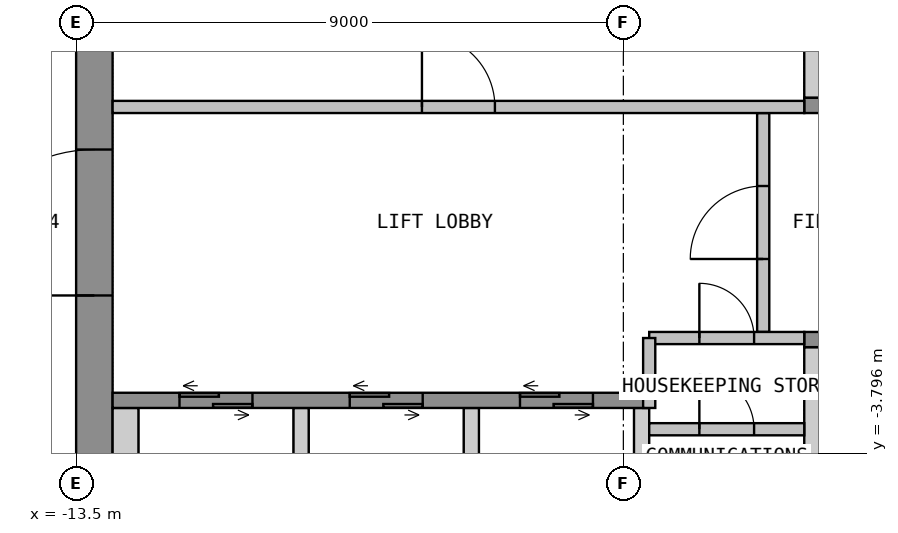
"""IFC4 building model, lengths in metres.
Left out: names, types, materials, properties, quantities, classifications, styles, units other than length and angle.
Written with IfcOpenShell. Run it as: python <this file> out.ifc"""

import sys

from ifc_helpers import new_model, si_unit, direction, frame, frame_2d, origin, place, context, subcontext, project, spatial, polyline, rectangle, outline, extrude, element, fill, save


model = new_model("IFC4")
c1 = context("Model", 3, precision=1e-05, world=origin(), true_north=direction((0.0, 1.0)))
c2 = subcontext(c1, "Body", "Model", "MODEL_VIEW")
j1 = project(units=[si_unit("LENGTHUNIT", "METRE"), si_unit("PLANEANGLEUNIT", "RADIAN")], contexts=[c1])
p1 = place(None, origin())
s1 = spatial("IfcSite", under=j1, at=p1, CompositionType="ELEMENT")
p2 = place(p1, origin())
s2 = spatial("IfcBuilding", under=s1, at=p2, CompositionType="ELEMENT")
p3 = place(p2, frame((0.0, 0.0, 179.4)))
s3 = spatial("IfcBuildingStorey", under=s2, at=p3, CompositionType="ELEMENT", Elevation=179.4)
p4 = place(p3, frame((-13.2, -10.65, 0.0), z_axis=(0.0, 0.0, 1.0), x_axis=(0.0, 1.0, 0.0)))
e1 = element("IfcWall", 1, at=p4, inside=s3, PredefinedType="SHEAR", context=c2, shape_type="SweptSolid", body=[
    extrude(rectangle(XDim=21.3, YDim=0.6, at=frame_2d((10.65, 0.0))), origin(), (0.0, 0.0, 1.0), 4.15),
])
p5 = place(p4, frame((9.45, 0.0, 0.0)))
e2 = element("IfcOpeningElement", 2, at=p5, cuts=e1, PredefinedType="OPENING", context=c2, shape_type="SweptSolid", body=[
    extrude(rectangle(XDim=2.4, YDim=2.1, at=frame_2d((1.2, 1.05))), frame((0.0, 0.31, 0.0), z_axis=(0.0, -1.0, 0.0), x_axis=(1.0, 0.0, 0.0)), (0.0, 0.0, 1.0), 0.62),
])
p6 = place(p3, origin())
e3 = element("IfcWall", 3, at=p6, inside=s3, PredefinedType="SHEAR", context=c2, shape_type="SweptSolid", body=[
    extrude(outline(polyline([(-1.525, 2.05), (-1.275, 2.05), (-1.275, 4.75), (-1.525, 4.75), (-1.525, 2.05)])), origin(), (0.0, 0.0, 1.0), 4.15),
])
p7 = place(p3, frame((-1.525, 1.925, 0.0), z_axis=(0.0, 0.0, 1.0), x_axis=(1.0, 0.0, 0.0)))
e4 = element("IfcWall", 4, at=p7, inside=s3, PredefinedType="SHEAR", context=c2, shape_type="SweptSolid", body=[
    extrude(rectangle(XDim=3.05, YDim=0.25, at=frame_2d((1.525, 0.0))), origin(), (0.0, 0.0, 1.0), 4.15),
])
p8 = place(p7, frame((0.925, 0.0, 0.0)))
e5 = element("IfcOpeningElement", 5, at=p8, cuts=e4, PredefinedType="OPENING", context=c2, shape_type="SweptSolid", body=[
    extrude(rectangle(XDim=1.2, YDim=2.1, at=frame_2d((0.6, 1.05))), frame((0.0, 0.135, 0.0), z_axis=(0.0, -1.0, 0.0), x_axis=(1.0, 0.0, 0.0)), (0.0, 0.0, 1.0), 0.27),
])
p9 = place(p3, origin())
e6 = element("IfcWall", 6, at=p9, inside=s3, PredefinedType="SHEAR", context=c2, shape_type="SweptSolid", body=[
    extrude(outline(polyline([(-12.9, -4.75), (-12.475, -4.75), (-12.475, -3.05), (-12.9, -3.05), (-12.9, -4.75)])), origin(), (0.0, 0.0, 1.0), 4.15),
])
p10 = place(p3, origin())
e7 = element("IfcWall", 7, at=p10, inside=s3, PredefinedType="SHEAR", context=c2, shape_type="SweptSolid", body=[
    extrude(outline(polyline([(-9.925, -4.75), (-9.675, -4.75), (-9.675, -3.05), (-9.925, -3.05), (-9.925, -4.75)])), origin(), (0.0, 0.0, 1.0), 4.15),
])
p11 = place(p3, origin())
e8 = element("IfcWall", 8, at=p11, inside=s3, PredefinedType="SHEAR", context=c2, shape_type="SweptSolid", body=[
    extrude(outline(polyline([(-7.125, -4.75), (-6.875, -4.75), (-6.875, -3.05), (-7.125, -3.05), (-7.125, -4.75)])), origin(), (0.0, 0.0, 1.0), 4.15),
])
p12 = place(p3, origin())
e9 = element("IfcWall", 9, at=p12, inside=s3, PredefinedType="SHEAR", context=c2, shape_type="SweptSolid", body=[
    extrude(outline(polyline([(-4.325, -4.75), (-4.075, -4.75), (-4.075, -3.05), (-4.325, -3.05), (-4.325, -4.75)])), origin(), (0.0, 0.0, 1.0), 4.15),
])
p13 = place(p3, origin())
e10 = element("IfcWall", 10, at=p13, inside=s3, PredefinedType="SHEAR", context=c2, shape_type="SweptSolid", body=[
    extrude(outline(polyline([(-1.525, -4.75), (-1.275, -4.75), (-1.275, -2.05), (-1.525, -2.05), (-1.525, -4.75)])), origin(), (0.0, 0.0, 1.0), 4.15),
])
p14 = place(p3, frame((-12.9, -2.925, 0.0), z_axis=(0.0, 0.0, 1.0), x_axis=(1.0, 0.0, 0.0)))
e11 = element("IfcWall", 11, at=p14, inside=s3, PredefinedType="SHEAR", context=c2, shape_type="SweptSolid", body=[
    extrude(rectangle(XDim=8.825, YDim=0.25, at=frame_2d((4.413, 0.0))), origin(), (0.0, 0.0, 1.0), 4.15),
])
p15 = place(p14, frame((1.1, 0.0, 0.0)))
e12 = element("IfcOpeningElement", 12, at=p15, cuts=e11, PredefinedType="OPENING", context=c2, shape_type="SweptSolid", body=[
    extrude(rectangle(XDim=1.2, YDim=2.1, at=frame_2d((0.6, 1.05))), frame((0.0, 0.135, 0.0), z_axis=(0.0, -1.0, 0.0), x_axis=(1.0, 0.0, 0.0)), (0.0, 0.0, 1.0), 0.27),
])
p16 = place(p14, frame((3.9, 0.0, 0.0)))
e13 = element("IfcOpeningElement", 13, at=p16, cuts=e11, PredefinedType="OPENING", context=c2, shape_type="SweptSolid", body=[
    extrude(rectangle(XDim=1.2, YDim=2.1, at=frame_2d((0.6, 1.05))), frame((0.0, 0.135, 0.0), z_axis=(0.0, -1.0, 0.0), x_axis=(1.0, 0.0, 0.0)), (0.0, 0.0, 1.0), 0.27),
])
p17 = place(p14, frame((6.7, 0.0, 0.0)))
e14 = element("IfcOpeningElement", 14, at=p17, cuts=e11, PredefinedType="OPENING", context=c2, shape_type="SweptSolid", body=[
    extrude(rectangle(XDim=1.2, YDim=2.1, at=frame_2d((0.6, 1.05))), frame((0.0, 0.135, 0.0), z_axis=(0.0, -1.0, 0.0), x_axis=(1.0, 0.0, 0.0)), (0.0, 0.0, 1.0), 0.27),
])
p18 = place(p3, frame((-1.525, -1.925, 0.0), z_axis=(0.0, 0.0, 1.0), x_axis=(1.0, 0.0, 0.0)))
e15 = element("IfcWall", 15, at=p18, inside=s3, PredefinedType="SHEAR", context=c2, shape_type="SweptSolid", body=[
    extrude(rectangle(XDim=14.425, YDim=0.25, at=frame_2d((7.212, 0.0))), origin(), (0.0, 0.0, 1.0), 4.15),
])
p19 = place(p18, frame((0.925, 0.0, 0.0)))
e16 = element("IfcOpeningElement", 16, at=p19, cuts=e15, PredefinedType="OPENING", context=c2, shape_type="SweptSolid", body=[
    extrude(rectangle(XDim=1.2, YDim=2.1, at=frame_2d((0.6, 1.05))), frame((0.0, 0.135, 0.0), z_axis=(0.0, -1.0, 0.0), x_axis=(1.0, 0.0, 0.0)), (0.0, 0.0, 1.0), 0.27),
])
p20 = place(p18, frame((3.725, 0.0, 0.0)))
e17 = element("IfcOpeningElement", 17, at=p20, cuts=e15, PredefinedType="OPENING", context=c2, shape_type="SweptSolid", body=[
    extrude(rectangle(XDim=1.2, YDim=2.1, at=frame_2d((0.6, 1.05))), frame((0.0, 0.135, 0.0), z_axis=(0.0, -1.0, 0.0), x_axis=(1.0, 0.0, 0.0)), (0.0, 0.0, 1.0), 0.27),
])
p21 = place(p3, frame((-2.2, -1.8, 0.0), z_axis=(0.0, 0.0, 1.0), x_axis=(0.0, 1.0, 0.0)))
e18 = element("IfcWall", 18, at=p21, inside=s3, PredefinedType="PARTITIONING", context=c2, shape_type="SweptSolid", body=[
    extrude(rectangle(XDim=3.6, YDim=0.2, at=frame_2d((1.8, 0.0))), origin(), (0.0, 0.0, 1.0), 4.15),
])
p22 = place(p21, frame((1.2, 0.0, 0.0)))
e19 = element("IfcOpeningElement", 19, at=p22, cuts=e18, PredefinedType="OPENING", context=c2, shape_type="SweptSolid", body=[
    extrude(rectangle(XDim=1.2, YDim=2.1, at=frame_2d((0.6, 1.05))), frame((0.0, 0.11, 0.0), z_axis=(0.0, -1.0, 0.0), x_axis=(1.0, 0.0, 0.0)), (0.0, 0.0, 1.0), 0.22),
])
p23 = place(p3, frame((-12.9, 1.9, 0.0), z_axis=(0.0, 0.0, 1.0), x_axis=(1.0, 0.0, 0.0)))
e20 = element("IfcWall", 20, at=p23, inside=s3, PredefinedType="PARTITIONING", context=c2, shape_type="SweptSolid", body=[
    extrude(rectangle(XDim=11.375, YDim=0.2, at=frame_2d((5.688, 0.0))), origin(), (0.0, 0.0, 1.0), 4.15),
])
p24 = place(p23, frame((5.087, 0.0, 0.0)))
e21 = element("IfcOpeningElement", 21, at=p24, cuts=e20, PredefinedType="OPENING", context=c2, shape_type="SweptSolid", body=[
    extrude(rectangle(XDim=1.2, YDim=2.1, at=frame_2d((0.6, 1.05))), frame((0.0, 0.11, 0.0), z_axis=(0.0, -1.0, 0.0), x_axis=(1.0, 0.0, 0.0)), (0.0, 0.0, 1.0), 0.22),
])
p25 = place(p3, frame((-4.075, -3.4, 0.0), z_axis=(0.0, 0.0, 1.0), x_axis=(1.0, 0.0, 0.0)))
e22 = element("IfcWall", 22, at=p25, inside=s3, PredefinedType="PARTITIONING", context=c2, shape_type="SweptSolid", body=[
    extrude(rectangle(XDim=2.55, YDim=0.2, at=frame_2d((1.275, 0.0))), origin(), (0.0, 0.0, 1.0), 4.15),
])
p26 = place(p25, frame((0.825, 0.0, 0.0)))
e23 = element("IfcOpeningElement", 23, at=p26, cuts=e22, PredefinedType="OPENING", context=c2, shape_type="SweptSolid", body=[
    extrude(rectangle(XDim=0.9, YDim=2.1, at=frame_2d((0.45, 1.05))), frame((0.0, 0.11, 0.0), z_axis=(0.0, -1.0, 0.0), x_axis=(1.0, 0.0, 0.0)), (0.0, 0.0, 1.0), 0.22),
])
p27 = place(p3, frame((-4.075, -1.9, 0.0), z_axis=(0.0, 0.0, 1.0), x_axis=(1.0, 0.0, 0.0)))
e24 = element("IfcWall", 24, at=p27, inside=s3, PredefinedType="PARTITIONING", context=c2, shape_type="SweptSolid", body=[
    extrude(rectangle(XDim=2.55, YDim=0.2, at=frame_2d((1.275, 0.0))), origin(), (0.0, 0.0, 1.0), 4.15),
])
p28 = place(p27, frame((0.825, 0.0, 0.0)))
e25 = element("IfcOpeningElement", 25, at=p28, cuts=e24, PredefinedType="OPENING", context=c2, shape_type="SweptSolid", body=[
    extrude(rectangle(XDim=0.9, YDim=2.1, at=frame_2d((0.45, 1.05))), frame((0.0, 0.11, 0.0), z_axis=(0.0, -1.0, 0.0), x_axis=(1.0, 0.0, 0.0)), (0.0, 0.0, 1.0), 0.22),
])
p29 = place(p3, frame((-4.075, -1.9, 0.0), z_axis=(0.0, 0.0, 1.0), x_axis=(0.0, -1.0, 0.0)))
e26 = element("IfcWall", 26, at=p29, inside=s3, PredefinedType="PARTITIONING", context=c2, shape_type="SweptSolid", body=[
    extrude(rectangle(XDim=1.15, YDim=0.2, at=frame_2d((0.575, 0.0))), origin(), (0.0, 0.0, 1.0), 4.15),
])
p30 = place(p5, origin())
e27 = element("IfcDoor", 27, at=p30, inside=s3, OperationType="DOUBLE_DOOR_DOUBLE_SWING", PredefinedType="DOOR", context=c2, shape_type="SweptSolid", body=[
    extrude(rectangle(XDim=2.4, YDim=2.1, at=frame_2d((1.2, 1.05))), frame((0.0, 0.025, 0.0), z_axis=(0.0, -1.0, 0.0), x_axis=(1.0, 0.0, 0.0)), (0.0, 0.0, 1.0), 0.05),
])
fill(e2, e27)
p31 = place(p15, origin())
e28 = element("IfcDoor", 28, at=p31, inside=s3, OperationType="DOUBLE_DOOR_SLIDING", PredefinedType="DOOR", context=c2, shape_type="SweptSolid", body=[
    extrude(rectangle(XDim=1.2, YDim=2.1, at=frame_2d((0.6, 1.05))), frame((0.0, 0.025, 0.0), z_axis=(0.0, -1.0, 0.0), x_axis=(1.0, 0.0, 0.0)), (0.0, 0.0, 1.0), 0.05),
])
fill(e12, e28)
p32 = place(p16, origin())
e29 = element("IfcDoor", 29, at=p32, inside=s3, OperationType="DOUBLE_DOOR_SLIDING", PredefinedType="DOOR", context=c2, shape_type="SweptSolid", body=[
    extrude(rectangle(XDim=1.2, YDim=2.1, at=frame_2d((0.6, 1.05))), frame((0.0, 0.025, 0.0), z_axis=(0.0, -1.0, 0.0), x_axis=(1.0, 0.0, 0.0)), (0.0, 0.0, 1.0), 0.05),
])
fill(e13, e29)
p33 = place(p17, origin())
e30 = element("IfcDoor", 30, at=p33, inside=s3, OperationType="DOUBLE_DOOR_SLIDING", PredefinedType="DOOR", context=c2, shape_type="SweptSolid", body=[
    extrude(rectangle(XDim=1.2, YDim=2.1, at=frame_2d((0.6, 1.05))), frame((0.0, 0.025, 0.0), z_axis=(0.0, -1.0, 0.0), x_axis=(1.0, 0.0, 0.0)), (0.0, 0.0, 1.0), 0.05),
])
fill(e14, e30)
p34 = place(p22, origin())
e31 = element("IfcDoor", 31, at=p34, inside=s3, OperationType="SINGLE_SWING_LEFT", PredefinedType="DOOR", context=c2, shape_type="SweptSolid", body=[
    extrude(rectangle(XDim=1.2, YDim=2.1, at=frame_2d((0.6, 1.05))), frame((0.0, 0.025, 0.0), z_axis=(0.0, -1.0, 0.0), x_axis=(1.0, 0.0, 0.0)), (0.0, 0.0, 1.0), 0.05),
])
fill(e19, e31)
p35 = place(p24, origin())
e32 = element("IfcDoor", 32, at=p35, inside=s3, OperationType="SINGLE_SWING_RIGHT", PredefinedType="DOOR", context=c2, shape_type="SweptSolid", body=[
    extrude(rectangle(XDim=1.2, YDim=2.1, at=frame_2d((0.6, 1.05))), frame((0.0, 0.025, 0.0), z_axis=(0.0, -1.0, 0.0), x_axis=(1.0, 0.0, 0.0)), (0.0, 0.0, 1.0), 0.05),
])
fill(e21, e32)
p36 = place(p26, origin())
e33 = element("IfcDoor", 33, at=p36, inside=s3, OperationType="SINGLE_SWING_LEFT", PredefinedType="DOOR", context=c2, shape_type="SweptSolid", body=[
    extrude(rectangle(XDim=0.9, YDim=2.1, at=frame_2d((0.45, 1.05))), frame((0.0, 0.025, 0.0), z_axis=(0.0, -1.0, 0.0), x_axis=(1.0, 0.0, 0.0)), (0.0, 0.0, 1.0), 0.05),
])
fill(e23, e33)
p37 = place(p28, origin())
e34 = element("IfcDoor", 34, at=p37, inside=s3, OperationType="SINGLE_SWING_LEFT", PredefinedType="DOOR", context=c2, shape_type="SweptSolid", body=[
    extrude(rectangle(XDim=0.9, YDim=2.1, at=frame_2d((0.45, 1.05))), frame((0.0, 0.025, 0.0), z_axis=(0.0, -1.0, 0.0), x_axis=(1.0, 0.0, 0.0)), (0.0, 0.0, 1.0), 0.05),
])
fill(e25, e34)
save(model, sys.argv[1])
